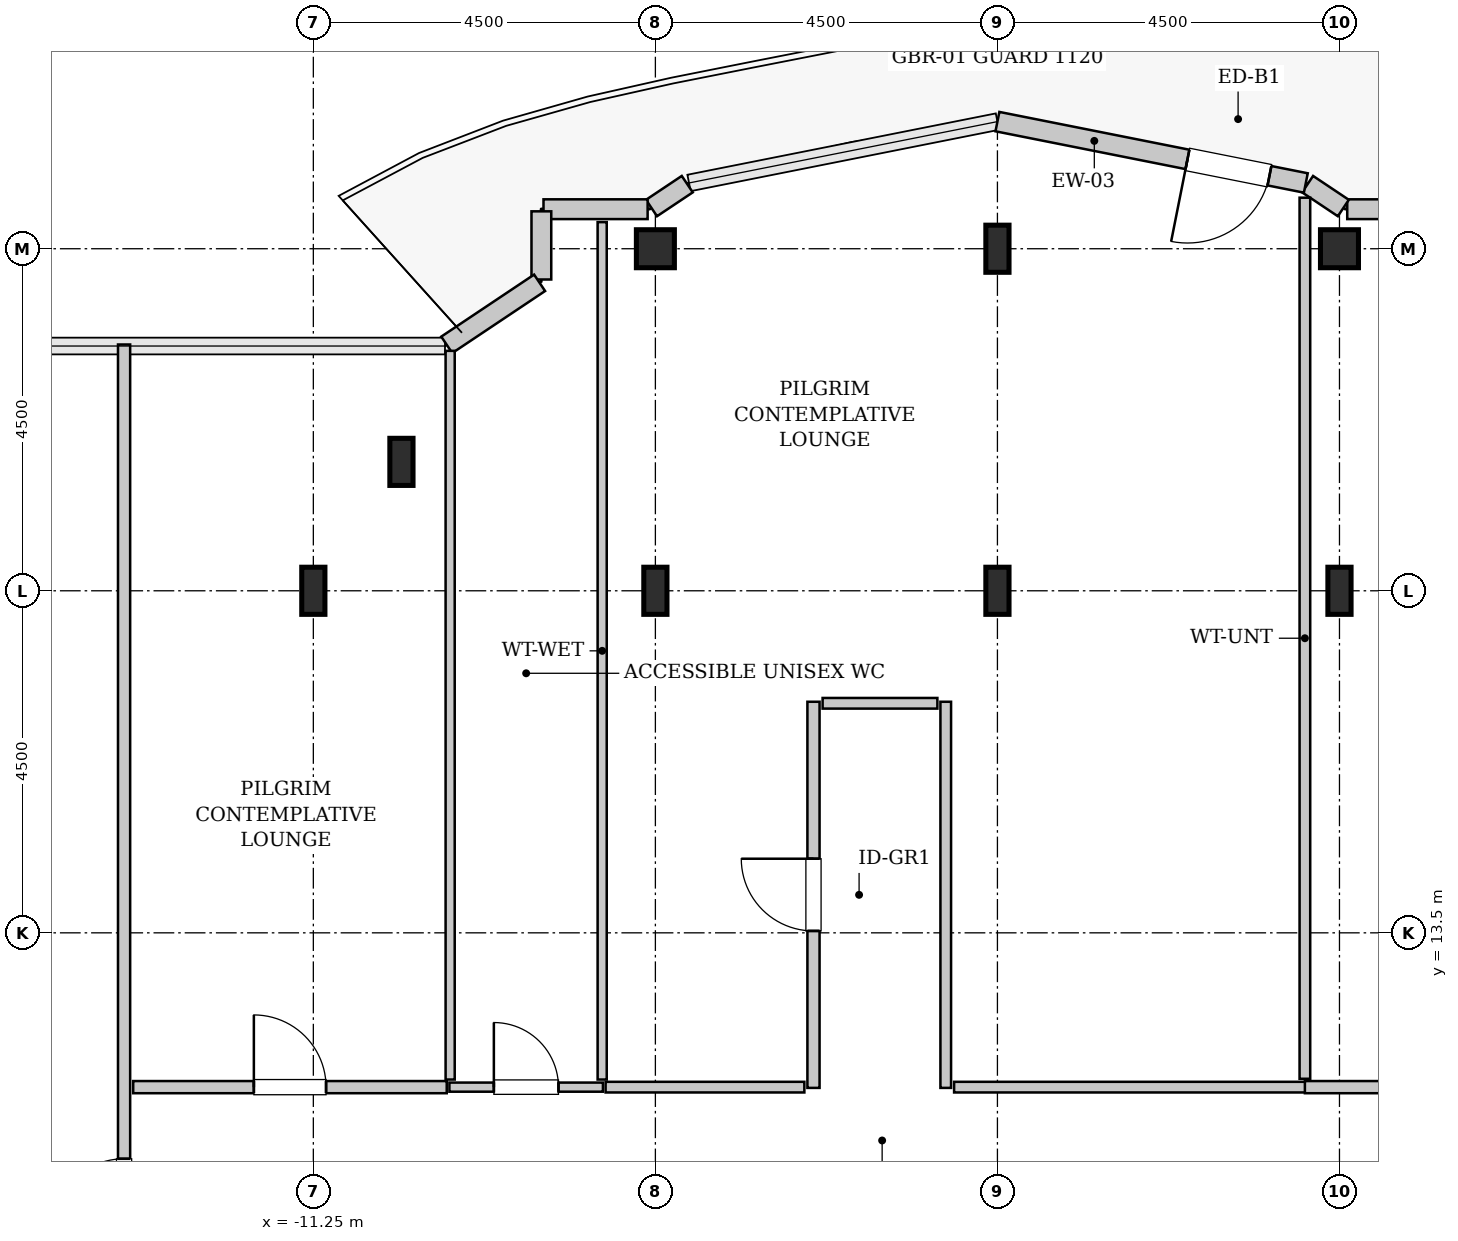
"""IFC4 building model, lengths in metres.
Left out: names, types, materials, properties, quantities, classifications, styles, units other than length and angle.
Written with IfcOpenShell. Run it as: python <this file> out.ifc"""

import sys

from ifc_helpers import new_model, si_unit, direction, frame, frame_2d, origin, origin_2d, place, context, subcontext, project, spatial, rectangle, hollow_rectangle, i_section, extrude, source, transform, mapped, element, fill, save


model = new_model("IFC4")
c1 = context("Model", 3, precision=1e-05, world=origin(), true_north=direction((0.0, 1.0)))
c2 = subcontext(c1, "Body", "Model", "MODEL_VIEW")
j1 = project(units=[si_unit("LENGTHUNIT", "METRE"), si_unit("PLANEANGLEUNIT", "RADIAN")], contexts=[c1])
p1 = place(None, origin())
s1 = spatial("IfcSite", under=j1, at=p1, CompositionType="ELEMENT")
p2 = place(p1, origin())
s2 = spatial("IfcBuilding", under=s1, at=p2, CompositionType="ELEMENT")
p3 = place(p2, frame((0.0, 0.0, 302.6)))
s3 = spatial("IfcBuildingStorey", under=s2, at=p3, CompositionType="ELEMENT", Elevation=302.6)
m1 = source(origin(), c2, "Body", "SweptSolid", [
    extrude(i_section(OverallWidth=0.305, OverallDepth=0.62, WebThickness=0.021, FlangeThickness=0.04, FilletRadius=0.027, at=origin_2d()), origin(), (0.0, 0.0, 1.0), 3.8),
])
for number, where, z_axis, x_axis in (
    (1, (-11.25, 18.0, 0.0), (0.0, 0.0, 1.0), (1.0, 0.0, 0.0)),
    (2, (-10.091, 19.696, 0.0), (0.0, 0.0, 1.0), (1.0, 0.0, 0.0)),
    (3, (-6.75, 18.0, 0.0), (0.0, 0.0, 1.0), (1.0, 0.0, 0.0)),
):
    element("IfcColumn", number, at=place(p3, frame(where, z_axis=z_axis, x_axis=x_axis)), inside=s3, PredefinedType="COLUMN", context=c2, shape_type="MappedRepresentation", body=[
        mapped(m1, transform((0.0, 0.0, 0.0), x_axis=(1.0, 0.0, 0.0), y_axis=(0.0, 1.0, 0.0), z_axis=(0.0, 0.0, 1.0), scale=1.0)),
    ])
m2 = source(origin(), c2, "Body", "SweptSolid", [
    extrude(hollow_rectangle(XDim=0.5, YDim=0.5, WallThickness=0.025, InnerFilletRadius=0.025, OuterFilletRadius=0.05, at=origin_2d()), origin(), (0.0, 0.0, 1.0), 3.8),
])
p4 = place(p3, frame((-6.75, 22.5, 0.0), z_axis=(0.0, 0.0, 1.0), x_axis=(1.0, 0.0, 0.0)))
e4 = element("IfcColumn", 4, at=p4, inside=s3, PredefinedType="COLUMN", context=c2, shape_type="MappedRepresentation", body=[
    mapped(m2, transform((0.0, 0.0, 0.0), x_axis=(1.0, 0.0, 0.0), y_axis=(0.0, 1.0, 0.0), z_axis=(0.0, 0.0, 1.0), scale=1.0)),
])
for number, where, z_axis, x_axis in (
    (5, (-2.25, 18.0, 0.0), (0.0, 0.0, 1.0), (1.0, 0.0, 0.0)),
    (6, (-2.25, 22.5, 0.0), (0.0, 0.0, 1.0), (1.0, 0.0, 0.0)),
    (7, (2.25, 18.0, 0.0), (0.0, 0.0, 1.0), (1.0, 0.0, 0.0)),
):
    element("IfcColumn", number, at=place(p3, frame(where, z_axis=z_axis, x_axis=x_axis)), inside=s3, PredefinedType="COLUMN", context=c2, shape_type="MappedRepresentation", body=[
        mapped(m1, transform((0.0, 0.0, 0.0), x_axis=(1.0, 0.0, 0.0), y_axis=(0.0, 1.0, 0.0), z_axis=(0.0, 0.0, 1.0), scale=1.0)),
    ])
p5 = place(p3, frame((2.25, 22.5, 0.0), z_axis=(0.0, 0.0, 1.0), x_axis=(1.0, 0.0, 0.0)))
e8 = element("IfcColumn", 8, at=p5, inside=s3, PredefinedType="COLUMN", context=c2, shape_type="MappedRepresentation", body=[
    mapped(m2, transform((0.0, 0.0, 0.0), x_axis=(1.0, 0.0, 0.0), y_axis=(0.0, 1.0, 0.0), z_axis=(0.0, 0.0, 1.0), scale=1.0)),
])
m3 = source(origin(), c2, "Body", "SweptSolid", [
    extrude(rectangle(XDim=1.37, YDim=0.26, at=frame_2d((0.685, 0.0))), origin(), (0.0, 0.0, 1.0), 3.55),
])
p6 = place(p3, frame((3.722, 23.02, 0.0), z_axis=(0.0, 0.0, 1.0), x_axis=(-1.0, 0.0, 0.0)))
e9 = element("IfcWall", 9, at=p6, inside=s3, PredefinedType="SOLIDWALL", context=c2, shape_type="MappedRepresentation", body=[
    mapped(m3, transform((0.0, 0.0, 0.0), x_axis=(1.0, 0.0, 0.0), y_axis=(0.0, 1.0, 0.0), z_axis=(0.0, 0.0, 1.0), scale=1.0)),
])
m4 = source(origin(), c2, "Body", "SweptSolid", [
    extrude(rectangle(XDim=0.565, YDim=0.26, at=frame_2d((0.283, 0.0))), origin(), (0.0, 0.0, 1.0), 3.55),
])
p7 = place(p3, frame((2.301, 23.036, 0.0), z_axis=(0.0, 0.0, 1.0), x_axis=(-0.831651492666, 0.555297933317, 0.0)))
e10 = element("IfcWall", 10, at=p7, inside=s3, PredefinedType="SOLIDWALL", context=c2, shape_type="MappedRepresentation", body=[
    mapped(m4, transform((0.0, 0.0, 0.0), x_axis=(1.0, 0.0, 0.0), y_axis=(0.0, 1.0, 0.0), z_axis=(0.0, 0.0, 1.0), scale=1.0)),
])
m5 = source(origin(), c2, "Body", "SweptSolid", [
    extrude(rectangle(XDim=4.137, YDim=0.26, at=frame_2d((2.068, 0.0))), origin(), (0.0, 0.0, 1.0), 3.55),
])
p8 = place(p3, frame((1.807, 23.365, 0.0), z_axis=(0.0, 0.0, 1.0), x_axis=(-0.980782170794, 0.195105954428, 0.0)))
e11 = element("IfcWall", 11, at=p8, inside=s3, PredefinedType="SOLIDWALL", context=c2, shape_type="MappedRepresentation", body=[
    mapped(m5, transform((0.0, 0.0, 0.0), x_axis=(1.0, 0.0, 0.0), y_axis=(0.0, 1.0, 0.0), z_axis=(0.0, 0.0, 1.0), scale=1.0)),
])
p9 = place(p8, frame((0.488, 0.0, 0.0)))
e12 = element("IfcOpeningElement", 12, at=p9, cuts=e11, PredefinedType="OPENING", context=c2, shape_type="SweptSolid", body=[
    extrude(rectangle(XDim=1.1, YDim=2.2, at=frame_2d((0.55, 1.1))), frame((0.0, 0.14, 0.0), z_axis=(0.0, -1.0, 0.0), x_axis=(1.0, 0.0, 0.0)), (0.0, 0.0, 1.0), 0.28),
])
p10 = place(p3, frame((-6.331, 23.35, 0.0), z_axis=(0.0, 0.0, 1.0), x_axis=(-0.831651492666, -0.555297933317, 0.0)))
e13 = element("IfcWall", 13, at=p10, inside=s3, PredefinedType="SOLIDWALL", context=c2, shape_type="MappedRepresentation", body=[
    mapped(m4, transform((0.0, 0.0, 0.0), x_axis=(1.0, 0.0, 0.0), y_axis=(0.0, 1.0, 0.0), z_axis=(0.0, 0.0, 1.0), scale=1.0)),
])
p11 = place(p3, frame((-6.852, 23.02, 0.0), z_axis=(0.0, 0.0, 1.0), x_axis=(-1.0, 0.0, 0.0)))
e14 = element("IfcWall", 14, at=p11, inside=s3, PredefinedType="SOLIDWALL", context=c2, shape_type="MappedRepresentation", body=[
    mapped(m3, transform((0.0, 0.0, 0.0), x_axis=(1.0, 0.0, 0.0), y_axis=(0.0, 1.0, 0.0), z_axis=(0.0, 0.0, 1.0), scale=1.0)),
])
m6 = source(origin(), c2, "Body", "SweptSolid", [
    extrude(rectangle(XDim=0.897, YDim=0.26, at=frame_2d((0.448, 0.0))), origin(), (0.0, 0.0, 1.0), 3.55),
])
p12 = place(p3, frame((-8.25, 22.992, 0.0), z_axis=(0.0, 0.0, 1.0), x_axis=(0.0, -1.0, 0.0)))
e15 = element("IfcWall", 15, at=p12, inside=s3, PredefinedType="SOLIDWALL", context=c2, shape_type="MappedRepresentation", body=[
    mapped(m6, transform((0.0, 0.0, 0.0), x_axis=(1.0, 0.0, 0.0), y_axis=(0.0, 1.0, 0.0), z_axis=(0.0, 0.0, 1.0), scale=1.0)),
])
m7 = source(origin(), c2, "Body", "SweptSolid", [
    extrude(rectangle(XDim=1.469, YDim=0.26, at=frame_2d((0.734, 0.0))), origin(), (0.0, 0.0, 1.0), 3.55),
])
p13 = place(p3, frame((-8.273, 22.052, 0.0), z_axis=(0.0, 0.0, 1.0), x_axis=(-0.831461760506, -0.555581983884, 0.0)))
e16 = element("IfcWall", 16, at=p13, inside=s3, PredefinedType="SOLIDWALL", context=c2, shape_type="MappedRepresentation", body=[
    mapped(m7, transform((0.0, 0.0, 0.0), x_axis=(1.0, 0.0, 0.0), y_axis=(0.0, 1.0, 0.0), z_axis=(0.0, 0.0, 1.0), scale=1.0)),
])
m8 = source(origin(), c2, "Body", "SweptSolid", [
    extrude(rectangle(XDim=2.02, YDim=0.12, at=frame_2d((1.01, 0.0))), origin(), (0.0, 0.0, 1.0), 3.535),
])
p14 = place(p3, frame((-9.46, 11.47, 0.0), z_axis=(0.0, 0.0, 1.0), x_axis=(1.0, 0.0, 0.0)))
e17 = element("IfcWall", 17, at=p14, inside=s3, PredefinedType="PLUMBINGWALL", context=c2, shape_type="MappedRepresentation", body=[
    mapped(m8, transform((0.0, 0.0, 0.0), x_axis=(1.0, 0.0, 0.0), y_axis=(0.0, 1.0, 0.0), z_axis=(0.0, 0.0, 1.0), scale=1.0)),
])
p15 = place(p14, frame((0.585, 0.0, 0.0)))
e18 = element("IfcOpeningElement", 18, at=p15, cuts=e17, PredefinedType="OPENING", context=c2, shape_type="SweptSolid", body=[
    extrude(rectangle(XDim=0.85, YDim=2.1, at=frame_2d((0.425, 1.05))), frame((0.0, 0.07, 0.0), z_axis=(0.0, -1.0, 0.0), x_axis=(1.0, 0.0, 0.0)), (0.0, 0.0, 1.0), 0.14),
])
m9 = source(origin(), c2, "Body", "SweptSolid", [
    extrude(rectangle(XDim=11.28, YDim=0.12, at=frame_2d((5.64, 0.0))), origin(), (0.0, 0.0, 1.0), 3.535),
])
p16 = place(p3, frame((-7.45, 11.57, 0.0), z_axis=(0.0, 0.0, 1.0), x_axis=(0.0, 1.0, 0.0)))
e19 = element("IfcWall", 19, at=p16, inside=s3, PredefinedType="PLUMBINGWALL", context=c2, shape_type="MappedRepresentation", body=[
    mapped(m9, transform((0.0, 0.0, 0.0), x_axis=(1.0, 0.0, 0.0), y_axis=(0.0, 1.0, 0.0), z_axis=(0.0, 0.0, 1.0), scale=1.0)),
])
m10 = source(origin(), c2, "Body", "SweptSolid", [
    extrude(rectangle(XDim=9.587, YDim=0.12, at=frame_2d((4.793, 0.0))), origin(), (0.0, 0.0, 1.0), 3.535),
])
p17 = place(p3, frame((-9.45, 11.57, 0.0), z_axis=(0.0, 0.0, 1.0), x_axis=(0.0, 1.0, 0.0)))
e20 = element("IfcWall", 20, at=p17, inside=s3, PredefinedType="PLUMBINGWALL", context=c2, shape_type="MappedRepresentation", body=[
    mapped(m10, transform((0.0, 0.0, 0.0), x_axis=(1.0, 0.0, 0.0), y_axis=(0.0, 1.0, 0.0), z_axis=(0.0, 0.0, 1.0), scale=1.0)),
])
m11 = source(origin(), c2, "Body", "SweptSolid", [
    extrude(rectangle(XDim=12.645, YDim=0.16, at=frame_2d((6.323, 0.0))), origin(), (0.0, 0.0, 1.0), 3.535),
])
p18 = place(p3, frame((-13.74, 8.595, 0.0), z_axis=(0.0, 0.0, 1.0), x_axis=(0.0, 1.0, 0.0)))
e21 = element("IfcWall", 21, at=p18, inside=s3, PredefinedType="PARTITIONING", context=c2, shape_type="MappedRepresentation", body=[
    mapped(m11, transform((0.0, 0.0, 0.0), x_axis=(1.0, 0.0, 0.0), y_axis=(0.0, 1.0, 0.0), z_axis=(0.0, 0.0, 1.0), scale=1.0)),
])
p19 = place(p18, frame((0.982, 0.0, 0.0)))
e22 = element("IfcOpeningElement", 22, at=p19, cuts=e21, PredefinedType="OPENING", context=c2, shape_type="SweptSolid", body=[
    extrude(rectangle(XDim=0.95, YDim=2.1, at=frame_2d((0.475, 1.05))), frame((0.0, 0.09, 0.0), z_axis=(0.0, -1.0, 0.0), x_axis=(1.0, 0.0, 0.0)), (0.0, 0.0, 1.0), 0.18),
])
m12 = source(origin(), c2, "Body", "SweptSolid", [
    extrude(rectangle(XDim=4.125, YDim=0.16, at=frame_2d((2.062, 0.0))), origin(), (0.0, 0.0, 1.0), 3.535),
])
p20 = place(p3, frame((-13.62, 11.47, 0.0), z_axis=(0.0, 0.0, 1.0), x_axis=(1.0, 0.0, 0.0)))
e23 = element("IfcWall", 23, at=p20, inside=s3, PredefinedType="PARTITIONING", context=c2, shape_type="MappedRepresentation", body=[
    mapped(m12, transform((0.0, 0.0, 0.0), x_axis=(1.0, 0.0, 0.0), y_axis=(0.0, 1.0, 0.0), z_axis=(0.0, 0.0, 1.0), scale=1.0)),
])
p21 = place(p20, frame((1.587, 0.0, 0.0)))
e24 = element("IfcOpeningElement", 24, at=p21, cuts=e23, PredefinedType="OPENING", context=c2, shape_type="SweptSolid", body=[
    extrude(rectangle(XDim=0.95, YDim=2.1, at=frame_2d((0.475, 1.05))), frame((0.0, 0.09, 0.0), z_axis=(0.0, -1.0, 0.0), x_axis=(1.0, 0.0, 0.0)), (0.0, 0.0, 1.0), 0.18),
])
m13 = source(origin(), c2, "Body", "SweptSolid", [
    extrude(rectangle(XDim=5.08, YDim=0.16, at=frame_2d((2.54, 0.0))), origin(), (0.0, 0.0, 1.0), 3.535),
])
p22 = place(p3, frame((-4.67, 11.46, 0.0), z_axis=(0.0, 0.0, 1.0), x_axis=(0.0, 1.0, 0.0)))
e25 = element("IfcWall", 25, at=p22, inside=s3, PredefinedType="PARTITIONING", context=c2, shape_type="MappedRepresentation", body=[
    mapped(m13, transform((0.0, 0.0, 0.0), x_axis=(1.0, 0.0, 0.0), y_axis=(0.0, 1.0, 0.0), z_axis=(0.0, 0.0, 1.0), scale=1.0)),
])
p23 = place(p22, frame((2.065, 0.0, 0.0)))
e26 = element("IfcOpeningElement", 26, at=p23, cuts=e25, PredefinedType="OPENING", context=c2, shape_type="SweptSolid", body=[
    extrude(rectangle(XDim=0.95, YDim=2.1, at=frame_2d((0.475, 1.05))), frame((0.0, 0.09, 0.0), z_axis=(0.0, -1.0, 0.0), x_axis=(1.0, 0.0, 0.0)), (0.0, 0.0, 1.0), 0.18),
])
m14 = source(origin(), c2, "Body", "SweptSolid", [
    extrude(rectangle(XDim=5.08, YDim=0.14, at=frame_2d((2.54, 0.0))), origin(), (0.0, 0.0, 1.0), 3.535),
])
p24 = place(p3, frame((-2.93, 11.46, 0.0), z_axis=(0.0, 0.0, 1.0), x_axis=(0.0, 1.0, 0.0)))
e27 = element("IfcWall", 27, at=p24, inside=s3, PredefinedType="PARTITIONING", context=c2, shape_type="MappedRepresentation", body=[
    mapped(m14, transform((0.0, 0.0, 0.0), x_axis=(1.0, 0.0, 0.0), y_axis=(0.0, 1.0, 0.0), z_axis=(0.0, 0.0, 1.0), scale=1.0)),
])
m15 = source(origin(), c2, "Body", "SweptSolid", [
    extrude(rectangle(XDim=4.625, YDim=0.14, at=frame_2d((2.312, 0.0))), origin(), (0.0, 0.0, 1.0), 3.535),
])
p25 = place(p3, frame((-2.82, 11.47, 0.0), z_axis=(0.0, 0.0, 1.0), x_axis=(1.0, 0.0, 0.0)))
e28 = element("IfcWall", 28, at=p25, inside=s3, PredefinedType="PARTITIONING", context=c2, shape_type="MappedRepresentation", body=[
    mapped(m15, transform((0.0, 0.0, 0.0), x_axis=(1.0, 0.0, 0.0), y_axis=(0.0, 1.0, 0.0), z_axis=(0.0, 0.0, 1.0), scale=1.0)),
])
m16 = source(origin(), c2, "Body", "SweptSolid", [
    extrude(rectangle(XDim=2.615, YDim=0.14, at=frame_2d((1.308, 0.0))), origin(), (0.0, 0.0, 1.0), 3.535),
])
p26 = place(p3, frame((-7.405, 11.47, 0.0), z_axis=(0.0, 0.0, 1.0), x_axis=(1.0, 0.0, 0.0)))
e29 = element("IfcWall", 29, at=p26, inside=s3, PredefinedType="PARTITIONING", context=c2, shape_type="MappedRepresentation", body=[
    mapped(m16, transform((0.0, 0.0, 0.0), x_axis=(1.0, 0.0, 0.0), y_axis=(0.0, 1.0, 0.0), z_axis=(0.0, 0.0, 1.0), scale=1.0)),
])
m17 = source(origin(), c2, "Body", "SweptSolid", [
    extrude(rectangle(XDim=1.51, YDim=0.14, at=frame_2d((0.755, 0.0))), origin(), (0.0, 0.0, 1.0), 3.535),
])
p27 = place(p3, frame((-4.55, 16.52, 0.0), z_axis=(0.0, 0.0, 1.0), x_axis=(1.0, 0.0, 0.0)))
e30 = element("IfcWall", 30, at=p27, inside=s3, PredefinedType="PARTITIONING", context=c2, shape_type="MappedRepresentation", body=[
    mapped(m17, transform((0.0, 0.0, 0.0), x_axis=(1.0, 0.0, 0.0), y_axis=(0.0, 1.0, 0.0), z_axis=(0.0, 0.0, 1.0), scale=1.0)),
])
m18 = source(origin(), c2, "Body", "SweptSolid", [
    extrude(rectangle(XDim=11.591, YDim=0.14, at=frame_2d((5.796, 0.0))), origin(), (0.0, 0.0, 1.0), 2.975),
])
p28 = place(p3, frame((1.795, 11.58, 0.0), z_axis=(0.0, 0.0, 1.0), x_axis=(0.0, 1.0, 0.0)))
e31 = element("IfcWall", 31, at=p28, inside=s3, PredefinedType="PARTITIONING", context=c2, shape_type="MappedRepresentation", body=[
    mapped(m18, transform((0.0, 0.0, 0.0), x_axis=(1.0, 0.0, 0.0), y_axis=(0.0, 1.0, 0.0), z_axis=(0.0, 0.0, 1.0), scale=1.0)),
])
m19 = source(origin(), c2, "Body", "SweptSolid", [
    extrude(rectangle(XDim=6.61, YDim=0.16, at=frame_2d((3.305, 0.0))), origin(), (0.0, 0.0, 1.0), 3.535),
])
p29 = place(p3, frame((1.795, 11.47, 0.0), z_axis=(0.0, 0.0, 1.0), x_axis=(1.0, 0.0, 0.0)))
e32 = element("IfcWall", 32, at=p29, inside=s3, PredefinedType="PARTITIONING", context=c2, shape_type="MappedRepresentation", body=[
    mapped(m19, transform((0.0, 0.0, 0.0), x_axis=(1.0, 0.0, 0.0), y_axis=(0.0, 1.0, 0.0), z_axis=(0.0, 0.0, 1.0), scale=1.0)),
])
p30 = place(p29, frame((2.83, 0.0, 0.0)))
e33 = element("IfcOpeningElement", 33, at=p30, cuts=e32, PredefinedType="OPENING", context=c2, shape_type="SweptSolid", body=[
    extrude(rectangle(XDim=0.95, YDim=2.1, at=frame_2d((0.475, 1.05))), frame((0.0, 0.09, 0.0), z_axis=(0.0, -1.0, 0.0), x_axis=(1.0, 0.0, 0.0)), (0.0, 0.0, 1.0), 0.18),
])
m20 = source(origin(), c2, "Body", "SweptSolid", [
    extrude(rectangle(XDim=1.1, YDim=2.2, at=frame_2d((0.55, 1.1))), frame((0.0, 0.025, 0.0), z_axis=(0.0, -1.0, 0.0), x_axis=(1.0, 0.0, 0.0)), (0.0, 0.0, 1.0), 0.05),
])
p31 = place(p9, origin())
e34 = element("IfcDoor", 34, at=p31, inside=s3, OperationType="SINGLE_SWING_RIGHT", PredefinedType="DOOR", context=c2, shape_type="MappedRepresentation", body=[
    mapped(m20, transform((0.0, 0.0, 0.0), x_axis=(1.0, 0.0, 0.0), y_axis=(0.0, 1.0, 0.0), z_axis=(0.0, 0.0, 1.0), scale=1.0)),
])
fill(e12, e34)
m21 = source(origin(), c2, "Body", "SweptSolid", [
    extrude(rectangle(XDim=0.85, YDim=2.1, at=frame_2d((0.425, 1.05))), frame((0.0, 0.025, 0.0), z_axis=(0.0, -1.0, 0.0), x_axis=(1.0, 0.0, 0.0)), (0.0, 0.0, 1.0), 0.05),
])
p32 = place(p15, origin())
e35 = element("IfcDoor", 35, at=p32, inside=s3, OperationType="SINGLE_SWING_LEFT", PredefinedType="DOOR", context=c2, shape_type="MappedRepresentation", body=[
    mapped(m21, transform((0.0, 0.0, 0.0), x_axis=(1.0, 0.0, 0.0), y_axis=(0.0, 1.0, 0.0), z_axis=(0.0, 0.0, 1.0), scale=1.0)),
])
fill(e18, e35)
m22 = source(origin(), c2, "Body", "SweptSolid", [
    extrude(rectangle(XDim=0.95, YDim=2.1, at=frame_2d((0.475, 1.05))), frame((0.0, 0.025, 0.0), z_axis=(0.0, -1.0, 0.0), x_axis=(1.0, 0.0, 0.0)), (0.0, 0.0, 1.0), 0.05),
])
p33 = place(p19, origin())
e36 = element("IfcDoor", 36, at=p33, inside=s3, OperationType="SINGLE_SWING_LEFT", PredefinedType="DOOR", context=c2, shape_type="MappedRepresentation", body=[
    mapped(m22, transform((0.0, 0.0, 0.0), x_axis=(1.0, 0.0, 0.0), y_axis=(0.0, 1.0, 0.0), z_axis=(0.0, 0.0, 1.0), scale=1.0)),
])
fill(e22, e36)
p34 = place(p21, origin())
e37 = element("IfcDoor", 37, at=p34, inside=s3, OperationType="SINGLE_SWING_LEFT", PredefinedType="DOOR", context=c2, shape_type="MappedRepresentation", body=[
    mapped(m22, transform((0.0, 0.0, 0.0), x_axis=(1.0, 0.0, 0.0), y_axis=(0.0, 1.0, 0.0), z_axis=(0.0, 0.0, 1.0), scale=1.0)),
])
fill(e24, e37)
p35 = place(p23, origin())
e38 = element("IfcDoor", 38, at=p35, inside=s3, OperationType="SINGLE_SWING_RIGHT", PredefinedType="DOOR", context=c2, shape_type="MappedRepresentation", body=[
    mapped(m22, transform((0.0, 0.0, 0.0), x_axis=(1.0, 0.0, 0.0), y_axis=(0.0, 1.0, 0.0), z_axis=(0.0, 0.0, 1.0), scale=1.0)),
])
fill(e26, e38)
save(model, sys.argv[1])
